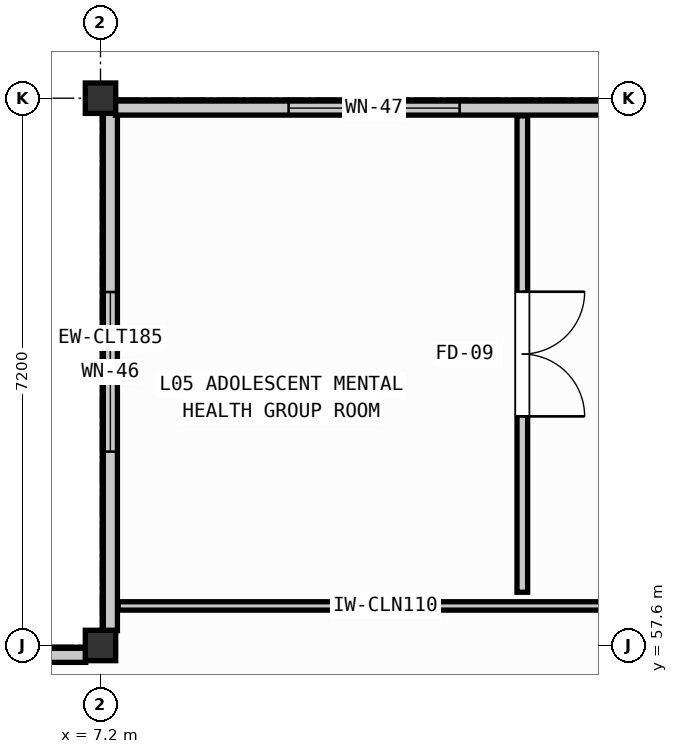
"""IFC4 building model, lengths in metres.
Left out: names, types, materials, properties, quantities, classifications, styles, units other than length and angle.
Written with IfcOpenShell. Run it as: python <this file> out.ifc"""

import sys

from ifc_helpers import new_model, si_unit, direction, frame, frame_2d, origin, origin_2d, place, context, subcontext, project, spatial, rectangle, extrude, element, fill, save


model = new_model("IFC4")
c1 = context("Model", 3, precision=1e-05, world=origin(), true_north=direction((0.0, 1.0)))
c2 = subcontext(c1, "Body", "Model", "MODEL_VIEW")
j1 = project(units=[si_unit("LENGTHUNIT", "METRE"), si_unit("PLANEANGLEUNIT", "RADIAN")], contexts=[c1])
p1 = place(None, origin())
s1 = spatial("IfcSite", under=j1, at=p1, CompositionType="ELEMENT")
p2 = place(p1, origin())
s2 = spatial("IfcBuilding", under=s1, at=p2, CompositionType="ELEMENT")
p3 = place(p2, frame((0.0, 0.0, 17.7)))
s3 = spatial("IfcBuildingStorey", under=s2, at=p3, CompositionType="ELEMENT", Elevation=17.7)
for number, where, z_axis, x_axis in (
    (1, (7.2, 57.6, 0.0), (0.0, 0.0, 1.0), (1.0, 0.0, 0.0)),
    (2, (7.2, 64.8, 0.0), (0.0, 0.0, 1.0), (1.0, 0.0, 0.0)),
):
    element("IfcColumn", number, at=place(p3, frame(where, z_axis=z_axis, x_axis=x_axis)), inside=s3, PredefinedType="COLUMN", context=c2, shape_type="SweptSolid", body=[
        extrude(rectangle(XDim=0.4, YDim=0.4, at=origin_2d()), origin(), (0.0, 0.0, 1.0), 3.69),
    ])
p4 = place(p3, frame((7.33, 57.795, 0.0), z_axis=(0.0, 0.0, 1.0), x_axis=(0.0, 1.0, 0.0)))
e3 = element("IfcWall", 3, at=p4, inside=s3, PredefinedType="SOLIDWALL", context=c2, shape_type="SweptSolid", body=[
    extrude(rectangle(XDim=6.81, YDim=0.185, at=frame_2d((3.405, 0.0))), origin(), (0.0, 0.0, 1.0), 3.05),
])
p5 = place(p4, frame((2.355, 0.0, 0.95)))
e4 = element("IfcOpeningElement", 4, at=p5, cuts=e3, PredefinedType="OPENING", context=c2, shape_type="SweptSolid", body=[
    extrude(rectangle(XDim=2.1, YDim=1.55, at=frame_2d((1.05, 0.775))), frame((0.0, 0.103, 0.0), z_axis=(0.0, -1.0, 0.0), x_axis=(1.0, 0.0, 0.0)), (0.0, 0.0, 1.0), 0.205),
])
p6 = place(p3, frame((7.395, 64.67, 0.0), z_axis=(0.0, 0.0, 1.0), x_axis=(1.0, 0.0, 0.0)))
e5 = element("IfcWall", 5, at=p6, inside=s3, PredefinedType="SOLIDWALL", context=c2, shape_type="SweptSolid", body=[
    extrude(rectangle(XDim=6.81, YDim=0.185, at=frame_2d((3.405, 0.0))), origin(), (0.0, 0.0, 1.0), 3.05),
])
p7 = place(p6, frame((2.28, 0.0, 0.95)))
e6 = element("IfcOpeningElement", 6, at=p7, cuts=e5, PredefinedType="OPENING", context=c2, shape_type="SweptSolid", body=[
    extrude(rectangle(XDim=2.25, YDim=1.55, at=frame_2d((1.125, 0.775))), frame((0.0, 0.103, 0.0), z_axis=(0.0, -1.0, 0.0), x_axis=(1.0, 0.0, 0.0)), (0.0, 0.0, 1.0), 0.205),
])
p8 = place(p3, frame((3.56, 57.47, 0.0), z_axis=(0.0, 0.0, 1.0), x_axis=(1.0, 0.0, 0.0)))
e7 = element("IfcWall", 7, at=p8, inside=s3, PredefinedType="SOLIDWALL", context=c2, shape_type="SweptSolid", body=[
    extrude(rectangle(XDim=3.445, YDim=0.185, at=frame_2d((1.722, 0.0))), origin(), (0.0, 0.0, 1.0), 3.13),
])
p9 = place(p8, frame((1.347, 0.0, 2.1)))
e8 = element("IfcOpeningElement", 8, at=p9, cuts=e7, PredefinedType="OPENING", context=c2, shape_type="SweptSolid", body=[
    extrude(rectangle(XDim=0.75, YDim=0.65, at=frame_2d((0.375, 0.325))), frame((0.0, 0.103, 0.0), z_axis=(0.0, -1.0, 0.0), x_axis=(1.0, 0.0, 0.0)), (0.0, 0.0, 1.0), 0.205),
])
p10 = place(p3, frame((7.433, 58.12, 0.0), z_axis=(0.0, 0.0, 1.0), x_axis=(1.0, 0.0, 0.0)))
e9 = element("IfcWall", 9, at=p10, inside=s3, PredefinedType="PARTITIONING", context=c2, shape_type="SweptSolid", body=[
    extrude(rectangle(XDim=7.027, YDim=0.11, at=frame_2d((3.514, 0.0))), origin(), (0.0, 0.0, 1.0), 3.13),
])
p11 = place(p3, frame((12.75, 64.567, 0.0), z_axis=(0.0, 0.0, 1.0), x_axis=(0.0, -1.0, 0.0)))
e10 = element("IfcWall", 10, at=p11, inside=s3, PredefinedType="PARTITIONING", context=c2, shape_type="SweptSolid", body=[
    extrude(rectangle(XDim=6.267, YDim=0.14, at=frame_2d((3.134, 0.0))), origin(), (0.0, 0.0, 1.0), 3.05),
])
p12 = place(p11, frame((2.314, 0.0, 0.0)))
e11 = element("IfcOpeningElement", 11, at=p12, cuts=e10, PredefinedType="OPENING", context=c2, shape_type="SweptSolid", body=[
    extrude(rectangle(XDim=1.64, YDim=2.24, at=frame_2d((0.82, 1.12))), frame((0.0, 0.08, 0.0), z_axis=(0.0, -1.0, 0.0), x_axis=(1.0, 0.0, 0.0)), (0.0, 0.0, 1.0), 0.16),
])
p13 = place(p5, origin())
e12 = element("IfcWindow", 12, at=p13, inside=s3, PartitioningType="SINGLE_PANEL", PredefinedType="WINDOW", context=c2, shape_type="SweptSolid", body=[
    extrude(rectangle(XDim=2.1, YDim=1.55, at=frame_2d((1.05, 0.775))), frame((0.0, 0.03, 0.0), z_axis=(0.0, -1.0, 0.0), x_axis=(1.0, 0.0, 0.0)), (0.0, 0.0, 1.0), 0.06),
])
fill(e4, e12)
p14 = place(p7, origin())
e13 = element("IfcWindow", 13, at=p14, inside=s3, PartitioningType="SINGLE_PANEL", PredefinedType="WINDOW", context=c2, shape_type="SweptSolid", body=[
    extrude(rectangle(XDim=2.25, YDim=1.55, at=frame_2d((1.125, 0.775))), frame((0.0, 0.03, 0.0), z_axis=(0.0, -1.0, 0.0), x_axis=(1.0, 0.0, 0.0)), (0.0, 0.0, 1.0), 0.06),
])
fill(e6, e13)
p15 = place(p12, origin())
e14 = element("IfcDoor", 14, at=p15, inside=s3, OperationType="DOUBLE_DOOR_SINGLE_SWING", PredefinedType="DOOR", context=c2, shape_type="SweptSolid", body=[
    extrude(rectangle(XDim=1.64, YDim=2.24, at=frame_2d((0.82, 1.12))), frame((0.0, 0.025, 0.0), z_axis=(0.0, -1.0, 0.0), x_axis=(1.0, 0.0, 0.0)), (0.0, 0.0, 1.0), 0.05),
])
fill(e11, e14)
save(model, sys.argv[1])
